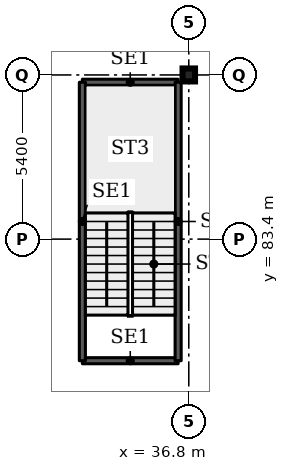
"""IFC4 building model, lengths in metres.
Left out: names, types, materials, properties, quantities, classifications, styles, units other than length and angle.
Written with IfcOpenShell. Run it as: python <this file> out.ifc"""

import sys

from ifc_helpers import new_model, si_unit, direction, frame, frame_2d, origin, origin_2d, place, context, subcontext, project, spatial, rectangle, i_section, extrude, element, save


model = new_model("IFC4")
c1 = context("Model", 3, precision=1e-05, world=origin(), true_north=direction((0.0, 1.0)))
c2 = subcontext(c1, "Body", "Model", "MODEL_VIEW")
j1 = project(units=[si_unit("LENGTHUNIT", "METRE"), si_unit("PLANEANGLEUNIT", "RADIAN")], contexts=[c1])
p1 = place(None, origin())
s1 = spatial("IfcSite", under=j1, at=p1, CompositionType="ELEMENT")
p2 = place(p1, origin())
s2 = spatial("IfcBuilding", under=s1, at=p2, CompositionType="ELEMENT")
p3 = place(p2, frame((0.0, 0.0, 12.5)))
s3 = spatial("IfcBuildingStorey", under=s2, at=p3, CompositionType="ELEMENT", Elevation=12.5)
p4 = place(p3, frame((36.8, 88.8, 0.0), z_axis=(0.0, 0.0, 1.0), x_axis=(1.0, 0.0, 0.0)))
e1 = element("IfcColumn", 1, at=p4, inside=s3, PredefinedType="COLUMN", context=c2, shape_type="SweptSolid", body=[
    extrude(i_section(OverallWidth=0.409, OverallDepth=0.425, WebThickness=0.033, FlangeThickness=0.052, FilletRadius=0.013, at=origin_2d()), origin(), (0.0, 0.0, 1.0), 4.5),
])
for number, where, z_axis, x_axis in (
    (2, (33.3, 79.4, 0.0), (0.0, 0.0, 1.0), (1.0, 0.0, 0.0)),
    (3, (33.3, 88.56, 0.0), (0.0, 0.0, 1.0), (1.0, 0.0, 0.0)),
):
    element("IfcWall", number, at=place(p3, frame(where, z_axis=z_axis, x_axis=x_axis)), inside=s3, PredefinedType="SHEAR", context=c2, shape_type="SweptSolid", body=[
        extrude(rectangle(XDim=3.15, YDim=0.2, at=frame_2d((1.575, 0.0))), origin(), (0.0, 0.0, 1.0), 4.5),
    ])
for number, where, z_axis, x_axis in (
    (4, (33.3, 79.4, 0.0), (0.0, 0.0, 1.0), (0.0, 1.0, 0.0)),
    (5, (36.45, 79.4, 0.0), (0.0, 0.0, 1.0), (0.0, 1.0, 0.0)),
):
    element("IfcWall", number, at=place(p3, frame(where, z_axis=z_axis, x_axis=x_axis)), inside=s3, PredefinedType="SHEAR", context=c2, shape_type="SweptSolid", body=[
        extrude(rectangle(XDim=9.16, YDim=0.2, at=frame_2d((4.58, 0.0))), origin(), (0.0, 0.0, 1.0), 4.5),
    ])
save(model, sys.argv[1])
